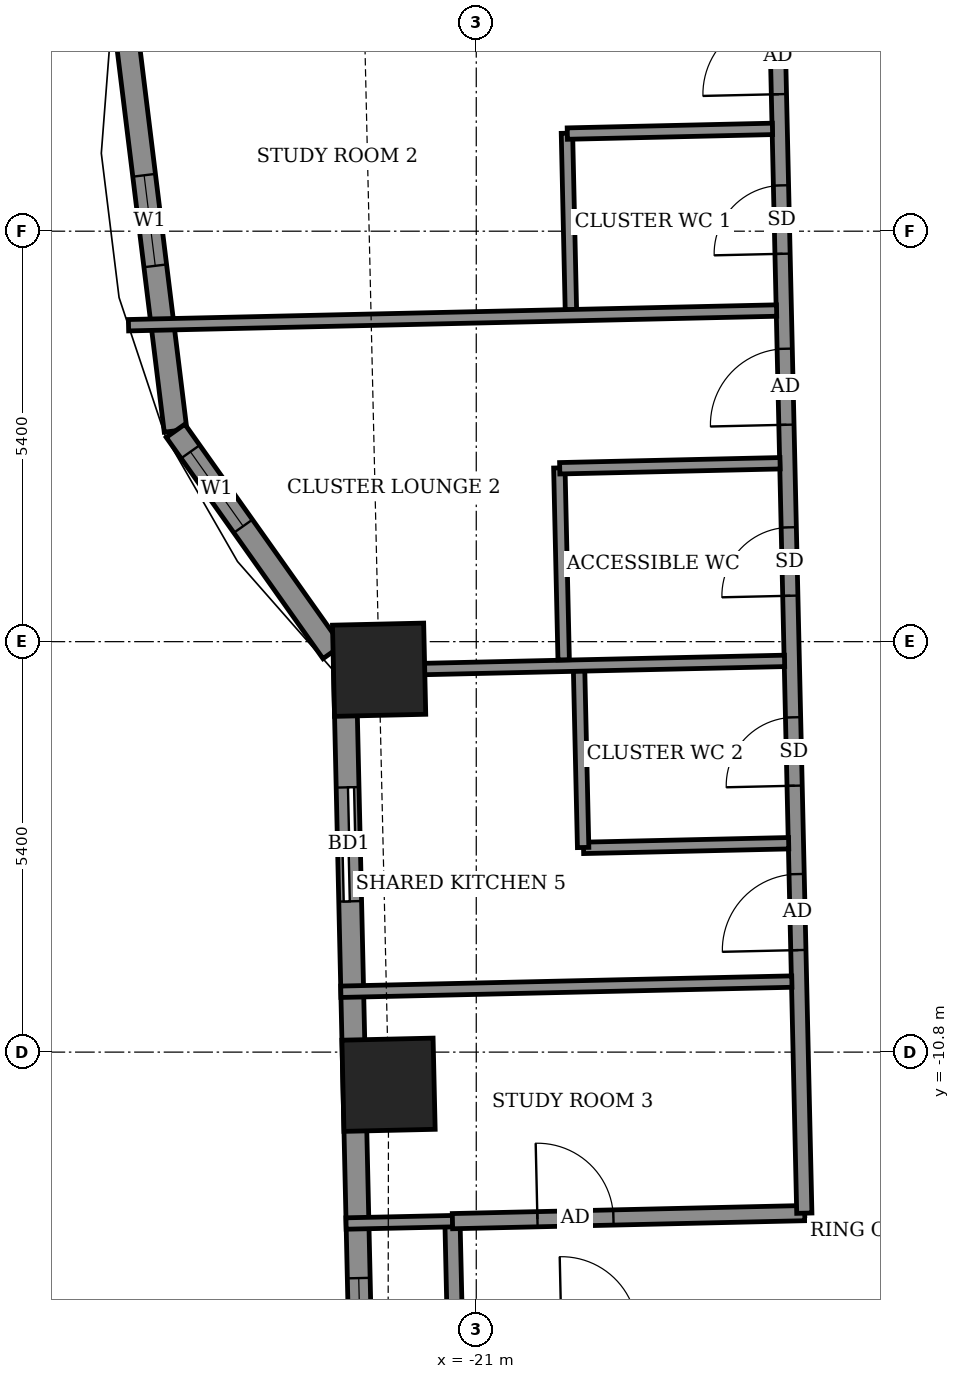
"""IFC4 building model, lengths in metres.
Left out: names, types, materials, properties, quantities, classifications, styles, units other than length and angle.
Written with IfcOpenShell. Run it as: python <this file> out.ifc"""

import sys

from ifc_helpers import new_model, si_unit, direction, frame, frame_2d, origin, origin_2d, place, context, subcontext, project, spatial, rectangle, extrude, element, fill, save


model = new_model("IFC4")
c1 = context("Model", 3, precision=1e-05, world=origin(), true_north=direction((0.0, 1.0)))
c2 = subcontext(c1, "Body", "Model", "MODEL_VIEW")
j1 = project(units=[si_unit("LENGTHUNIT", "METRE"), si_unit("PLANEANGLEUNIT", "RADIAN")], contexts=[c1])
p1 = place(None, origin())
s1 = spatial("IfcSite", under=j1, at=p1, CompositionType="ELEMENT")
p2 = place(p1, origin())
s2 = spatial("IfcBuilding", under=s1, at=p2, CompositionType="ELEMENT")
p3 = place(p2, frame((0.0, 0.0, 189.7)))
s3 = spatial("IfcBuildingStorey", under=s2, at=p3, CompositionType="ELEMENT", Elevation=189.7)
for number, where, z_axis, x_axis in (
    (1, (-22.278, -5.769, -0.55), (0.0, 0.0, 1.0), (0.023, -1.0, 0.0)),
    (2, (-22.154, -11.229, -0.55), (0.0, 0.0, 1.0), (0.023, -1.0, 0.0)),
):
    element("IfcColumn", number, at=place(p3, frame(where, z_axis=z_axis, x_axis=x_axis)), inside=s3, PredefinedType="COLUMN", context=c2, shape_type="SweptSolid", body=[
        extrude(rectangle(XDim=1.2, YDim=1.2, at=origin_2d()), origin(), (0.0, 0.0, 1.0), 3.6),
    ])
p4 = place(p3, frame((-25.637, 2.906, 0.0), z_axis=(0.0, 0.0, 1.0), x_axis=(0.122163831021, -0.992509948761, 0.0)))
e3 = element("IfcWall", 3, at=p4, inside=s3, PredefinedType="SOLIDWALL", context=c2, shape_type="SweptSolid", body=[
    extrude(rectangle(XDim=5.574, YDim=0.3, at=frame_2d((2.787, 0.0))), origin(), (0.0, 0.0, 1.0), 3.05),
])
p5 = place(p4, frame((2.187, 0.0, 0.9)))
e4 = element("IfcOpeningElement", 4, at=p5, cuts=e3, PredefinedType="OPENING", context=c2, shape_type="SweptSolid", body=[
    extrude(rectangle(XDim=1.2, YDim=1.5, at=frame_2d((0.6, 0.75))), frame((0.0, 0.16, 0.0), z_axis=(0.0, -1.0, 0.0), x_axis=(1.0, 0.0, 0.0)), (0.0, 0.0, 1.0), 0.32),
])
p6 = place(p3, frame((-24.956, -2.626, 0.0), z_axis=(0.0, 0.0, 1.0), x_axis=(0.578009745555, -0.816029861, 0.0)))
e5 = element("IfcWall", 5, at=p6, inside=s3, PredefinedType="SOLIDWALL", context=c2, shape_type="SweptSolid", body=[
    extrude(rectangle(XDim=3.567, YDim=0.3, at=frame_2d((1.784, 0.0))), origin(), (0.0, 0.0, 1.0), 3.05),
])
p7 = place(p6, frame((0.338, 0.0, 0.9)))
e6 = element("IfcOpeningElement", 6, at=p7, cuts=e5, PredefinedType="OPENING", context=c2, shape_type="SweptSolid", body=[
    extrude(rectangle(XDim=1.2, YDim=1.5, at=frame_2d((0.6, 0.75))), frame((0.0, 0.16, 0.0), z_axis=(0.0, -1.0, 0.0), x_axis=(1.0, 0.0, 0.0)), (0.0, 0.0, 1.0), 0.32),
])
p8 = place(p3, frame((-22.729, -5.725, 0.0), z_axis=(0.0, 0.0, 1.0), x_axis=(0.022726014582, -0.999741730779, 0.0)))
e7 = element("IfcWall", 7, at=p8, inside=s3, PredefinedType="SOLIDWALL", context=c2, shape_type="SweptSolid", body=[
    extrude(rectangle(XDim=10.829, YDim=0.3, at=frame_2d((5.414, 0.0))), origin(), (0.0, 0.0, 1.0), 3.05),
])
p9 = place(p8, frame((1.592, 0.0, 0.0)))
e8 = element("IfcOpeningElement", 8, at=p9, cuts=e7, PredefinedType="OPENING", context=c2, shape_type="SweptSolid", body=[
    extrude(rectangle(XDim=1.5, YDim=2.4, at=frame_2d((0.75, 1.2))), frame((0.0, 0.16, 0.0), z_axis=(0.0, -1.0, 0.0), x_axis=(1.0, 0.0, 0.0)), (0.0, 0.0, 1.0), 0.32),
])
p10 = place(p8, frame((8.05, 0.0, 0.9)))
e9 = element("IfcOpeningElement", 9, at=p10, cuts=e7, PredefinedType="OPENING", context=c2, shape_type="SweptSolid", body=[
    extrude(rectangle(XDim=1.2, YDim=1.5, at=frame_2d((0.6, 0.75))), frame((0.0, 0.16, 0.0), z_axis=(0.0, -1.0, 0.0), x_axis=(1.0, 0.0, 0.0)), (0.0, 0.0, 1.0), 0.32),
])
p11 = place(p3, frame((-21.279, -14.523, 0.0), z_axis=(0.0, 0.0, 1.0), x_axis=(0.999742878501, 0.022675468818, 0.0)))
e10 = element("IfcWall", 10, at=p11, inside=s3, PredefinedType="PARTITIONING", context=c2, shape_type="SweptSolid", body=[
    extrude(rectangle(XDim=46.48, YDim=0.2, at=frame_2d((23.24, 0.0))), origin(), (0.0, 0.0, 1.0), 3.05),
])
p12 = place(p11, frame((1.4, 0.0, 0.0)))
e11 = element("IfcOpeningElement", 11, at=p12, cuts=e10, PredefinedType="OPENING", context=c2, shape_type="SweptSolid", body=[
    extrude(rectangle(XDim=1.0, YDim=2.1, at=frame_2d((0.5, 1.05))), frame((0.0, 0.11, 0.0), z_axis=(0.0, -1.0, 0.0), x_axis=(1.0, 0.0, 0.0)), (0.0, 0.0, 1.0), 0.22),
])
p13 = place(p11, frame((5.95, 0.0, 0.0)))
e12 = element("IfcOpeningElement", 12, at=p13, cuts=e10, PredefinedType="OPENING", context=c2, shape_type="SweptSolid", body=[
    extrude(rectangle(XDim=0.9, YDim=2.1, at=frame_2d((0.45, 1.05))), frame((0.0, 0.11, 0.0), z_axis=(0.0, -1.0, 0.0), x_axis=(1.0, 0.0, 0.0)), (0.0, 0.0, 1.0), 0.22),
])
p14 = place(p11, frame((10.575, 0.0, 0.0)))
e13 = element("IfcOpeningElement", 13, at=p14, cuts=e10, PredefinedType="OPENING", context=c2, shape_type="SweptSolid", body=[
    extrude(rectangle(XDim=0.9, YDim=2.1, at=frame_2d((0.45, 1.05))), frame((0.0, 0.11, 0.0), z_axis=(0.0, -1.0, 0.0), x_axis=(1.0, 0.0, 0.0)), (0.0, 0.0, 1.0), 0.22),
])
p15 = place(p11, frame((12.625, 0.0, 0.0)))
e14 = element("IfcOpeningElement", 14, at=p15, cuts=e10, PredefinedType="OPENING", context=c2, shape_type="SweptSolid", body=[
    extrude(rectangle(XDim=0.9, YDim=2.1, at=frame_2d((0.45, 1.05))), frame((0.0, 0.11, 0.0), z_axis=(0.0, -1.0, 0.0), x_axis=(1.0, 0.0, 0.0)), (0.0, 0.0, 1.0), 0.22),
])
p16 = place(p11, frame((19.4, 0.0, 0.0)))
e15 = element("IfcOpeningElement", 15, at=p16, cuts=e10, PredefinedType="OPENING", context=c2, shape_type="SweptSolid", body=[
    extrude(rectangle(XDim=0.9, YDim=2.1, at=frame_2d((0.45, 1.05))), frame((0.0, 0.11, 0.0), z_axis=(0.0, -1.0, 0.0), x_axis=(1.0, 0.0, 0.0)), (0.0, 0.0, 1.0), 0.22),
])
p17 = place(p11, frame((21.375, 0.0, 0.0)))
e16 = element("IfcOpeningElement", 16, at=p17, cuts=e10, PredefinedType="OPENING", context=c2, shape_type="SweptSolid", body=[
    extrude(rectangle(XDim=0.9, YDim=2.1, at=frame_2d((0.45, 1.05))), frame((0.0, 0.11, 0.0), z_axis=(0.0, -1.0, 0.0), x_axis=(1.0, 0.0, 0.0)), (0.0, 0.0, 1.0), 0.22),
])
p18 = place(p11, frame((28.15, 0.0, 0.0)))
e17 = element("IfcOpeningElement", 17, at=p18, cuts=e10, PredefinedType="OPENING", context=c2, shape_type="SweptSolid", body=[
    extrude(rectangle(XDim=0.9, YDim=2.1, at=frame_2d((0.45, 1.05))), frame((0.0, 0.11, 0.0), z_axis=(0.0, -1.0, 0.0), x_axis=(1.0, 0.0, 0.0)), (0.0, 0.0, 1.0), 0.22),
])
p19 = place(p11, frame((30.1, 0.0, 0.0)))
e18 = element("IfcOpeningElement", 18, at=p19, cuts=e10, PredefinedType="OPENING", context=c2, shape_type="SweptSolid", body=[
    extrude(rectangle(XDim=0.9, YDim=2.1, at=frame_2d((0.45, 1.05))), frame((0.0, 0.11, 0.0), z_axis=(0.0, -1.0, 0.0), x_axis=(1.0, 0.0, 0.0)), (0.0, 0.0, 1.0), 0.22),
])
p20 = place(p11, frame((36.875, 0.0, 0.0)))
e19 = element("IfcOpeningElement", 19, at=p20, cuts=e10, PredefinedType="OPENING", context=c2, shape_type="SweptSolid", body=[
    extrude(rectangle(XDim=0.9, YDim=2.1, at=frame_2d((0.45, 1.05))), frame((0.0, 0.11, 0.0), z_axis=(0.0, -1.0, 0.0), x_axis=(1.0, 0.0, 0.0)), (0.0, 0.0, 1.0), 0.22),
])
p21 = place(p11, frame((43.89, 0.0, 0.0)))
e20 = element("IfcOpeningElement", 20, at=p21, cuts=e10, PredefinedType="OPENING", context=c2, shape_type="SweptSolid", body=[
    extrude(rectangle(XDim=1.0, YDim=2.1, at=frame_2d((0.5, 1.05))), frame((0.0, 0.11, 0.0), z_axis=(0.0, -1.0, 0.0), x_axis=(1.0, 0.0, 0.0)), (0.0, 0.0, 1.0), 0.22),
])
p22 = place(p11, frame((39.05, 0.0, 0.0)))
e21 = element("IfcOpeningElement", 21, at=p22, cuts=e10, PredefinedType="OPENING", context=c2, shape_type="SweptSolid", body=[
    extrude(rectangle(XDim=0.9, YDim=2.1, at=frame_2d((0.45, 1.05))), frame((0.0, 0.11, 0.0), z_axis=(0.0, -1.0, 0.0), x_axis=(1.0, 0.0, 0.0)), (0.0, 0.0, 1.0), 0.22),
])
p23 = place(p3, frame((-21.279, -14.523, 0.0), z_axis=(0.0, 0.0, 1.0), x_axis=(-0.022632637625, 0.99974384905, 0.0)))
e22 = element("IfcWall", 22, at=p23, inside=s3, PredefinedType="PARTITIONING", context=c2, shape_type="SweptSolid", body=[
    extrude(rectangle(XDim=1.5, YDim=0.2, at=frame_2d((0.75, 0.0))), origin(), (0.0, 0.0, 1.0), 3.05),
])
p24 = place(p3, frame((-22.713, -13.055, 0.0), z_axis=(0.0, 0.0, 1.0), x_axis=(0.999756172383, 0.022081571112, 0.0)))
e23 = element("IfcWall", 23, at=p24, inside=s3, PredefinedType="PARTITIONING", context=c2, shape_type="SweptSolid", body=[
    extrude(rectangle(XDim=1.404, YDim=0.15, at=frame_2d((0.702, 0.0))), origin(), (0.0, 0.0, 1.0), 2.55),
])
p25 = place(p3, frame((-21.313, -13.024, 0.0), z_axis=(0.0, 0.0, 1.0), x_axis=(0.999738699021, 0.022858995594, 0.0)))
e24 = element("IfcWall", 24, at=p25, inside=s3, PredefinedType="PARTITIONING", context=c2, shape_type="SweptSolid", body=[
    extrude(rectangle(XDim=4.635, YDim=0.2, at=frame_2d((2.318, 0.0))), origin(), (0.0, 0.0, 1.0), 3.05),
])
p26 = place(p25, frame((1.118, 0.0, 0.0)))
e25 = element("IfcOpeningElement", 25, at=p26, cuts=e24, PredefinedType="OPENING", context=c2, shape_type="SweptSolid", body=[
    extrude(rectangle(XDim=1.0, YDim=2.1, at=frame_2d((0.5, 1.05))), frame((0.0, 0.11, 0.0), z_axis=(0.0, -1.0, 0.0), x_axis=(1.0, 0.0, 0.0)), (0.0, 0.0, 1.0), 0.22),
])
p27 = place(p3, frame((-16.684, -12.919, 0.0), z_axis=(0.0, 0.0, 1.0), x_axis=(-0.022694293906, 0.999742451346, 0.0)))
e26 = element("IfcWall", 26, at=p27, inside=s3, PredefinedType="PARTITIONING", context=c2, shape_type="SweptSolid", body=[
    extrude(rectangle(XDim=28.024, YDim=0.2, at=frame_2d((14.012, 0.0))), origin(), (0.0, 0.0, 1.0), 3.05),
])
p28 = place(p27, frame((22.825, 0.0, 0.0)))
e27 = element("IfcOpeningElement", 27, at=p28, cuts=e26, PredefinedType="OPENING", context=c2, shape_type="SweptSolid", body=[
    extrude(rectangle(XDim=1.0, YDim=2.1, at=frame_2d((0.5, 1.05))), frame((0.0, 0.11, 0.0), z_axis=(0.0, -1.0, 0.0), x_axis=(1.0, 0.0, 0.0)), (0.0, 0.0, 1.0), 0.22),
])
p29 = place(p27, frame((26.374, 0.0, 0.0)))
e28 = element("IfcOpeningElement", 28, at=p29, cuts=e26, PredefinedType="OPENING", context=c2, shape_type="SweptSolid", body=[
    extrude(rectangle(XDim=0.9, YDim=2.1, at=frame_2d((0.45, 1.05))), frame((0.0, 0.11, 0.0), z_axis=(0.0, -1.0, 0.0), x_axis=(1.0, 0.0, 0.0)), (0.0, 0.0, 1.0), 0.22),
])
p30 = place(p27, frame((16.7, 0.0, 0.0)))
e29 = element("IfcOpeningElement", 29, at=p30, cuts=e26, PredefinedType="OPENING", context=c2, shape_type="SweptSolid", body=[
    extrude(rectangle(XDim=1.0, YDim=2.1, at=frame_2d((0.5, 1.05))), frame((0.0, 0.11, 0.0), z_axis=(0.0, -1.0, 0.0), x_axis=(1.0, 0.0, 0.0)), (0.0, 0.0, 1.0), 0.22),
])
p31 = place(p27, frame((19.175, 0.0, 0.0)))
e30 = element("IfcOpeningElement", 30, at=p31, cuts=e26, PredefinedType="OPENING", context=c2, shape_type="SweptSolid", body=[
    extrude(rectangle(XDim=0.9, YDim=2.1, at=frame_2d((0.45, 1.05))), frame((0.0, 0.11, 0.0), z_axis=(0.0, -1.0, 0.0), x_axis=(1.0, 0.0, 0.0)), (0.0, 0.0, 1.0), 0.22),
])
p32 = place(p27, frame((14.725, 0.0, 0.0)))
e31 = element("IfcOpeningElement", 31, at=p32, cuts=e26, PredefinedType="OPENING", context=c2, shape_type="SweptSolid", body=[
    extrude(rectangle(XDim=1.0, YDim=2.1, at=frame_2d((0.5, 1.05))), frame((0.0, 0.11, 0.0), z_axis=(0.0, -1.0, 0.0), x_axis=(1.0, 0.0, 0.0)), (0.0, 0.0, 1.0), 0.22),
])
p33 = place(p27, frame((12.625, 0.0, 0.0)))
e32 = element("IfcOpeningElement", 32, at=p33, cuts=e26, PredefinedType="OPENING", context=c2, shape_type="SweptSolid", body=[
    extrude(rectangle(XDim=0.9, YDim=2.1, at=frame_2d((0.45, 1.05))), frame((0.0, 0.11, 0.0), z_axis=(0.0, -1.0, 0.0), x_axis=(1.0, 0.0, 0.0)), (0.0, 0.0, 1.0), 0.22),
])
p34 = place(p27, frame((10.375, 0.0, 0.0)))
e33 = element("IfcOpeningElement", 33, at=p34, cuts=e26, PredefinedType="OPENING", context=c2, shape_type="SweptSolid", body=[
    extrude(rectangle(XDim=1.0, YDim=2.1, at=frame_2d((0.5, 1.05))), frame((0.0, 0.11, 0.0), z_axis=(0.0, -1.0, 0.0), x_axis=(1.0, 0.0, 0.0)), (0.0, 0.0, 1.0), 0.22),
])
p35 = place(p27, frame((8.125, 0.0, 0.0)))
e34 = element("IfcOpeningElement", 34, at=p35, cuts=e26, PredefinedType="OPENING", context=c2, shape_type="SweptSolid", body=[
    extrude(rectangle(XDim=0.9, YDim=2.1, at=frame_2d((0.45, 1.05))), frame((0.0, 0.11, 0.0), z_axis=(0.0, -1.0, 0.0), x_axis=(1.0, 0.0, 0.0)), (0.0, 0.0, 1.0), 0.22),
])
p36 = place(p27, frame((3.462, 0.0, 0.0)))
e35 = element("IfcOpeningElement", 35, at=p36, cuts=e26, PredefinedType="OPENING", context=c2, shape_type="SweptSolid", body=[
    extrude(rectangle(XDim=1.0, YDim=2.1, at=frame_2d((0.5, 1.05))), frame((0.0, 0.11, 0.0), z_axis=(0.0, -1.0, 0.0), x_axis=(1.0, 0.0, 0.0)), (0.0, 0.0, 1.0), 0.22),
])
p37 = place(p27, frame((5.625, 0.0, 0.0)))
e36 = element("IfcOpeningElement", 36, at=p37, cuts=e26, PredefinedType="OPENING", context=c2, shape_type="SweptSolid", body=[
    extrude(rectangle(XDim=0.9, YDim=2.1, at=frame_2d((0.45, 1.05))), frame((0.0, 0.11, 0.0), z_axis=(0.0, -1.0, 0.0), x_axis=(1.0, 0.0, 0.0)), (0.0, 0.0, 1.0), 0.22),
])
p38 = place(p3, frame((-22.782, -10.006, 0.0), z_axis=(0.0, 0.0, 1.0), x_axis=(0.999745010927, 0.02258125611, 0.0)))
e37 = element("IfcWall", 37, at=p38, inside=s3, PredefinedType="PARTITIONING", context=c2, shape_type="SweptSolid", body=[
    extrude(rectangle(XDim=5.936, YDim=0.15, at=frame_2d((2.968, 0.0))), origin(), (0.0, 0.0, 1.0), 2.55),
])
p39 = place(p3, frame((-19.589, -8.113, 0.0), z_axis=(0.0, 0.0, 1.0), x_axis=(0.999744443191, 0.022606377605, 0.0)))
e38 = element("IfcWall", 38, at=p39, inside=s3, PredefinedType="PARTITIONING", context=c2, shape_type="SweptSolid", body=[
    extrude(rectangle(XDim=2.7, YDim=0.15, at=frame_2d((1.35, 0.0))), origin(), (0.0, 0.0, 1.0), 3.05),
])
p40 = place(p3, frame((-19.594, -8.108, 0.0), z_axis=(0.0, 0.0, 1.0), x_axis=(-0.02279059109, 0.999740260747, 0.0)))
e39 = element("IfcWall", 39, at=p40, inside=s3, PredefinedType="PARTITIONING", context=c2, shape_type="SweptSolid", body=[
    extrude(rectangle(XDim=2.324, YDim=0.15, at=frame_2d((1.162, 0.0))), origin(), (0.0, 0.0, 1.0), 3.05),
])
p41 = place(p3, frame((-22.578, -5.78, 0.0), z_axis=(0.0, 0.0, 1.0), x_axis=(0.999746200787, 0.022528515532, 0.0)))
e40 = element("IfcWall", 40, at=p41, inside=s3, PredefinedType="PARTITIONING", context=c2, shape_type="SweptSolid", body=[
    extrude(rectangle(XDim=5.635, YDim=0.15, at=frame_2d((2.818, 0.0))), origin(), (0.0, 0.0, 1.0), 3.05),
])
p42 = place(p3, frame((-19.85, -5.639, 0.0), z_axis=(0.0, 0.0, 1.0), x_axis=(-0.022523775833, 0.999746307581, 0.0)))
e41 = element("IfcWall", 41, at=p42, inside=s3, PredefinedType="PARTITIONING", context=c2, shape_type="SweptSolid", body=[
    extrude(rectangle(XDim=2.526, YDim=0.15, at=frame_2d((1.263, 0.0))), origin(), (0.0, 0.0, 1.0), 3.05),
])
p43 = place(p3, frame((-19.902, -3.119, 0.0), z_axis=(0.0, 0.0, 1.0), x_axis=(0.999741618182, 0.022730967319, 0.0)))
e42 = element("IfcWall", 42, at=p43, inside=s3, PredefinedType="PARTITIONING", context=c2, shape_type="SweptSolid", body=[
    extrude(rectangle(XDim=2.9, YDim=0.15, at=frame_2d((1.45, 0.0))), origin(), (0.0, 0.0, 1.0), 3.05),
])
p44 = place(p3, frame((-19.755, -1.035, 0.0), z_axis=(0.0, 0.0, 1.0), x_axis=(-0.022370700241, 0.999749744571, 0.0)))
e43 = element("IfcWall", 43, at=p44, inside=s3, PredefinedType="PARTITIONING", context=c2, shape_type="SweptSolid", body=[
    extrude(rectangle(XDim=2.324, YDim=0.15, at=frame_2d((1.162, 0.0))), origin(), (0.0, 0.0, 1.0), 3.05),
])
p45 = place(p3, frame((-25.575, -1.237, 0.0), z_axis=(0.0, 0.0, 1.0), x_axis=(0.999743576582, 0.022644670096, 0.0)))
e44 = element("IfcWall", 44, at=p45, inside=s3, PredefinedType="PARTITIONING", context=c2, shape_type="SweptSolid", body=[
    extrude(rectangle(XDim=8.528, YDim=0.15, at=frame_2d((4.264, 0.0))), origin(), (0.0, 0.0, 1.0), 2.05),
])
p46 = place(p3, frame((-19.802, 1.284, 0.0), z_axis=(0.0, 0.0, 1.0), x_axis=(0.999736155505, 0.022969966847, 0.0)))
e45 = element("IfcWall", 45, at=p46, inside=s3, PredefinedType="PARTITIONING", context=c2, shape_type="SweptSolid", body=[
    extrude(rectangle(XDim=2.7, YDim=0.15, at=frame_2d((1.35, 0.0))), origin(), (0.0, 0.0, 1.0), 3.05),
])
p47 = place(p5, origin())
e46 = element("IfcWindow", 46, at=p47, inside=s3, PartitioningType="SINGLE_PANEL", PredefinedType="WINDOW", context=c2, shape_type="SweptSolid", body=[
    extrude(rectangle(XDim=1.2, YDim=1.5, at=frame_2d((0.6, 0.75))), frame((0.0, 0.03, 0.0), z_axis=(0.0, -1.0, 0.0), x_axis=(1.0, 0.0, 0.0)), (0.0, 0.0, 1.0), 0.06),
])
fill(e4, e46)
p48 = place(p7, origin())
e47 = element("IfcWindow", 47, at=p48, inside=s3, PartitioningType="SINGLE_PANEL", PredefinedType="WINDOW", context=c2, shape_type="SweptSolid", body=[
    extrude(rectangle(XDim=1.2, YDim=1.5, at=frame_2d((0.6, 0.75))), frame((0.0, 0.03, 0.0), z_axis=(0.0, -1.0, 0.0), x_axis=(1.0, 0.0, 0.0)), (0.0, 0.0, 1.0), 0.06),
])
fill(e6, e47)
p49 = place(p9, origin())
e48 = element("IfcDoor", 48, at=p49, inside=s3, OperationType="SLIDING_TO_LEFT", PredefinedType="DOOR", context=c2, shape_type="SweptSolid", body=[
    extrude(rectangle(XDim=1.5, YDim=2.4, at=frame_2d((0.75, 1.2))), frame((0.0, 0.025, 0.0), z_axis=(0.0, -1.0, 0.0), x_axis=(1.0, 0.0, 0.0)), (0.0, 0.0, 1.0), 0.05),
])
fill(e8, e48)
p50 = place(p10, origin())
e49 = element("IfcWindow", 49, at=p50, inside=s3, PartitioningType="SINGLE_PANEL", PredefinedType="WINDOW", context=c2, shape_type="SweptSolid", body=[
    extrude(rectangle(XDim=1.2, YDim=1.5, at=frame_2d((0.6, 0.75))), frame((0.0, 0.03, 0.0), z_axis=(0.0, -1.0, 0.0), x_axis=(1.0, 0.0, 0.0)), (0.0, 0.0, 1.0), 0.06),
])
fill(e9, e49)
p51 = place(p32, origin())
e50 = element("IfcDoor", 50, at=p51, inside=s3, OperationType="SINGLE_SWING_RIGHT", PredefinedType="DOOR", context=c2, shape_type="SweptSolid", body=[
    extrude(rectangle(XDim=1.0, YDim=2.1, at=frame_2d((0.5, 1.05))), frame((0.0, 0.025, 0.0), z_axis=(0.0, -1.0, 0.0), x_axis=(1.0, 0.0, 0.0)), (0.0, 0.0, 1.0), 0.05),
])
fill(e31, e50)
p52 = place(p33, origin())
e51 = element("IfcDoor", 51, at=p52, inside=s3, OperationType="SINGLE_SWING_RIGHT", PredefinedType="DOOR", context=c2, shape_type="SweptSolid", body=[
    extrude(rectangle(XDim=0.9, YDim=2.1, at=frame_2d((0.45, 1.05))), frame((0.0, 0.025, 0.0), z_axis=(0.0, -1.0, 0.0), x_axis=(1.0, 0.0, 0.0)), (0.0, 0.0, 1.0), 0.05),
])
fill(e32, e51)
p53 = place(p34, origin())
e52 = element("IfcDoor", 52, at=p53, inside=s3, OperationType="SINGLE_SWING_LEFT", PredefinedType="DOOR", context=c2, shape_type="SweptSolid", body=[
    extrude(rectangle(XDim=1.0, YDim=2.1, at=frame_2d((0.5, 1.05))), frame((0.0, 0.025, 0.0), z_axis=(0.0, -1.0, 0.0), x_axis=(1.0, 0.0, 0.0)), (0.0, 0.0, 1.0), 0.05),
])
fill(e33, e52)
p54 = place(p35, origin())
e53 = element("IfcDoor", 53, at=p54, inside=s3, OperationType="SINGLE_SWING_LEFT", PredefinedType="DOOR", context=c2, shape_type="SweptSolid", body=[
    extrude(rectangle(XDim=0.9, YDim=2.1, at=frame_2d((0.45, 1.05))), frame((0.0, 0.025, 0.0), z_axis=(0.0, -1.0, 0.0), x_axis=(1.0, 0.0, 0.0)), (0.0, 0.0, 1.0), 0.05),
])
fill(e34, e53)
p55 = place(p36, origin())
e54 = element("IfcDoor", 54, at=p55, inside=s3, OperationType="SINGLE_SWING_RIGHT", PredefinedType="DOOR", context=c2, shape_type="SweptSolid", body=[
    extrude(rectangle(XDim=1.0, YDim=2.1, at=frame_2d((0.5, 1.05))), frame((0.0, 0.025, 0.0), z_axis=(0.0, -1.0, 0.0), x_axis=(1.0, 0.0, 0.0)), (0.0, 0.0, 1.0), 0.05),
])
fill(e35, e54)
p56 = place(p37, origin())
e55 = element("IfcDoor", 55, at=p56, inside=s3, OperationType="SINGLE_SWING_RIGHT", PredefinedType="DOOR", context=c2, shape_type="SweptSolid", body=[
    extrude(rectangle(XDim=0.9, YDim=2.1, at=frame_2d((0.45, 1.05))), frame((0.0, 0.025, 0.0), z_axis=(0.0, -1.0, 0.0), x_axis=(1.0, 0.0, 0.0)), (0.0, 0.0, 1.0), 0.05),
])
fill(e36, e55)
p57 = place(p26, origin())
e56 = element("IfcDoor", 56, at=p57, inside=s3, OperationType="SINGLE_SWING_LEFT", PredefinedType="DOOR", context=c2, shape_type="SweptSolid", body=[
    extrude(rectangle(XDim=1.0, YDim=2.1, at=frame_2d((0.5, 1.05))), frame((0.0, 0.025, 0.0), z_axis=(0.0, -1.0, 0.0), x_axis=(1.0, 0.0, 0.0)), (0.0, 0.0, 1.0), 0.05),
])
fill(e25, e56)
save(model, sys.argv[1])
